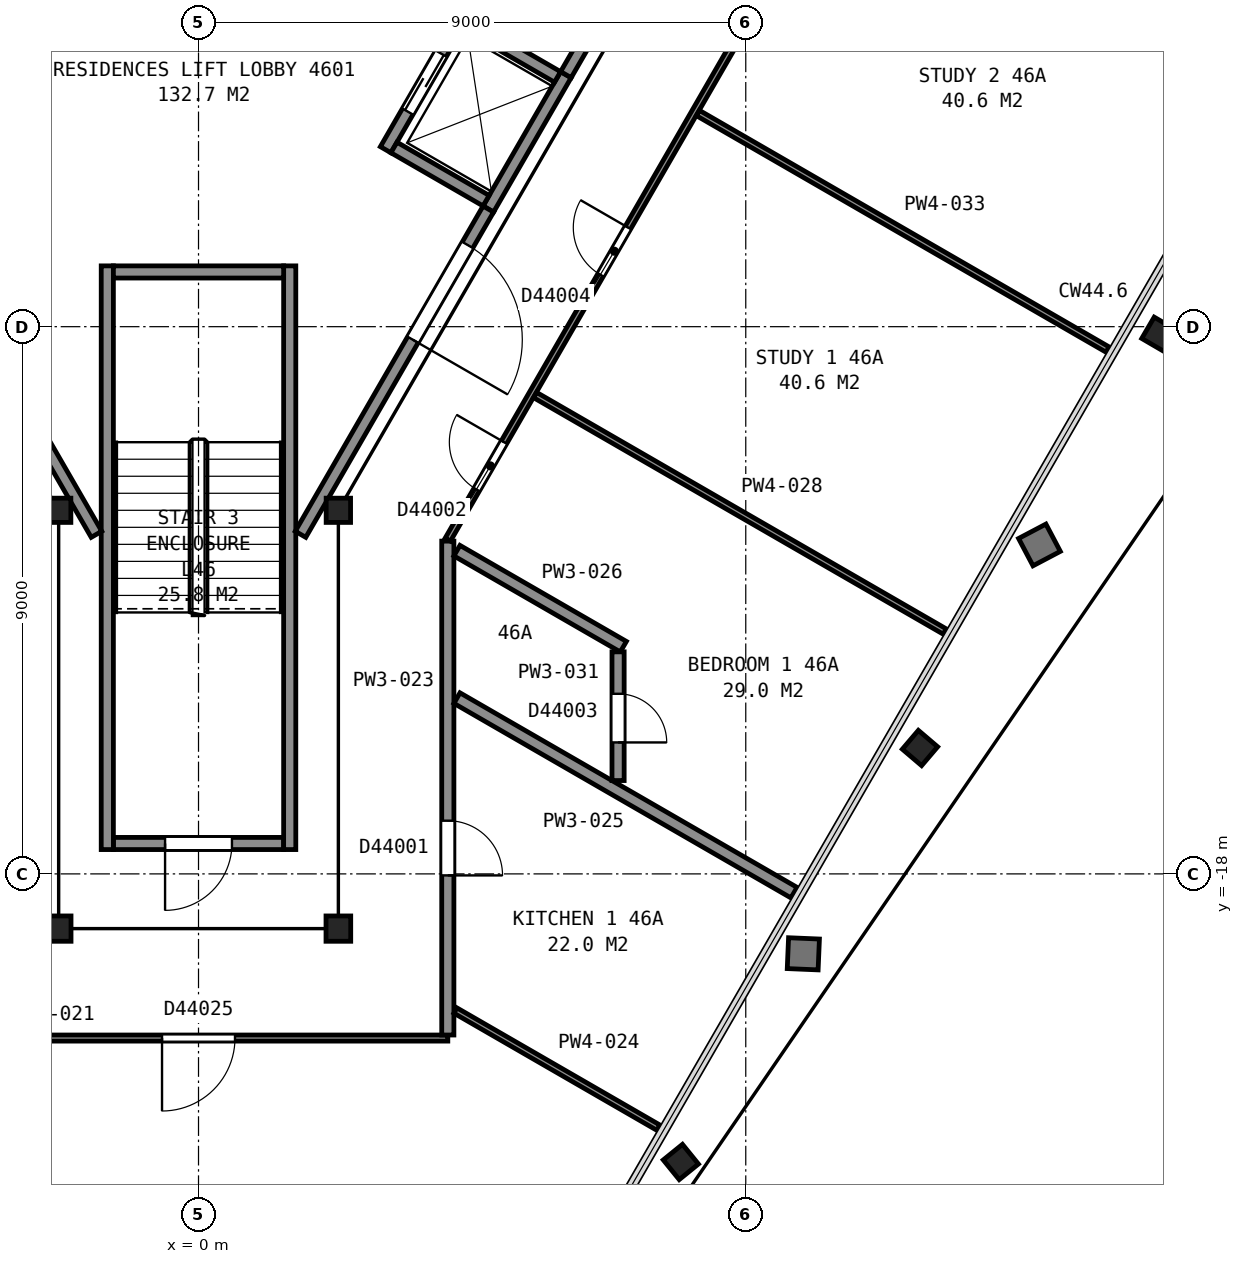
"""IFC4 building model, lengths in metres.
Left out: names, types, materials, properties, quantities, classifications, styles, units other than length and angle.
Written with IfcOpenShell. Run it as: python <this file> out.ifc"""

import sys

from ifc_helpers import new_model, si_unit, direction, frame, frame_2d, origin, origin_2d, place, context, subcontext, project, spatial, rectangle, i_section, extrude, element, fill, save


model = new_model("IFC4")
c1 = context("Model", 3, precision=1e-05, world=origin(), true_north=direction((0.0, 1.0)))
c2 = subcontext(c1, "Body", "Model", "MODEL_VIEW")
j1 = project(units=[si_unit("LENGTHUNIT", "METRE"), si_unit("PLANEANGLEUNIT", "RADIAN")], contexts=[c1])
p1 = place(None, origin())
s1 = spatial("IfcSite", under=j1, at=p1, CompositionType="ELEMENT")
p2 = place(p1, origin())
s2 = spatial("IfcBuilding", under=s1, at=p2, CompositionType="ELEMENT")
p3 = place(p2, frame((0.0, 0.0, 185.8)))
s3 = spatial("IfcBuildingStorey", under=s2, at=p3, CompositionType="ELEMENT", Elevation=185.8)
p4 = place(p3, frame((7.785, -22.556, 0.04), z_axis=(0.124490162422, -0.153645851019, 0.98025259598), x_axis=(-0.498753062579, -0.863744810544, -0.072043631407)))
e1 = element("IfcColumn", 1, at=p4, inside=s3, PredefinedType="COLUMN", context=c2, shape_type="SweptSolid", body=[
    extrude(i_section(OverallWidth=0.406, OverallDepth=0.417, WebThickness=0.03, FlangeThickness=0.048, FilletRadius=0.015, at=origin_2d()), origin(), (0.0, 0.0, 1.0), 3.693),
])
p5 = place(p3, frame((11.695, -15.784, 0.035), z_axis=(0.143331567224, -0.122063012087, 0.982118466845), x_axis=(-0.499578566378, -0.865574550711, -0.03466919636)))
e2 = element("IfcColumn", 2, at=p5, inside=s3, PredefinedType="COLUMN", context=c2, shape_type="SweptSolid", body=[
    extrude(i_section(OverallWidth=0.406, OverallDepth=0.417, WebThickness=0.03, FlangeThickness=0.048, FilletRadius=0.015, at=origin_2d()), origin(), (0.0, 0.0, 1.0), 3.696),
])
p6 = place(p3, frame((15.605, -9.013, 0.03), z_axis=(0.159333785609, -0.093016123912, 0.982833020129), x_axis=(-0.500289595457, -0.865857733626, -0.000840117374)))
e3 = element("IfcColumn", 3, at=p6, inside=s3, PredefinedType="COLUMN", context=c2, shape_type="SweptSolid", body=[
    extrude(i_section(OverallWidth=0.406, OverallDepth=0.417, WebThickness=0.03, FlangeThickness=0.048, FilletRadius=0.015, at=origin_2d()), origin(), (0.0, 0.0, 1.0), 3.703),
])
p7 = place(p3, frame((-2.3, -12.02, 0.0), z_axis=(0.0, 0.0, 1.0), x_axis=(1.0, 0.0, 0.0)))
e4 = element("IfcColumn", 4, at=p7, inside=s3, PredefinedType="COLUMN", context=c2, shape_type="SweptSolid", body=[
    extrude(i_section(OverallWidth=0.401, OverallDepth=0.399, WebThickness=0.025, FlangeThickness=0.04, FilletRadius=0.015, at=origin_2d()), origin(), (0.0, 0.0, 1.0), 3.7),
])
for number, where, z_axis, x_axis in (
    (5, (-2.3, -18.9, 0.0), (0.0, 0.0, 1.0), (-1.0, 0.0, 0.0)),
    (6, (2.3, -18.9, 0.0), (0.0, 0.0, 1.0), (-1.0, 0.0, 0.0)),
):
    element("IfcColumn", number, at=place(p3, frame(where, z_axis=z_axis, x_axis=x_axis)), inside=s3, PredefinedType="COLUMN", context=c2, shape_type="SweptSolid", body=[
        extrude(i_section(OverallWidth=0.406, OverallDepth=0.417, WebThickness=0.03, FlangeThickness=0.048, FilletRadius=0.015, at=origin_2d()), origin(), (0.0, 0.0, 1.0), 3.7),
    ])
p8 = place(p3, frame((2.3, -12.02, 0.0), z_axis=(0.0, 0.0, 1.0), x_axis=(1.0, 0.0, 0.0)))
e7 = element("IfcColumn", 7, at=p8, inside=s3, PredefinedType="COLUMN", context=c2, shape_type="SweptSolid", body=[
    extrude(i_section(OverallWidth=0.401, OverallDepth=0.399, WebThickness=0.025, FlangeThickness=0.04, FilletRadius=0.015, at=origin_2d()), origin(), (0.0, 0.0, 1.0), 3.7),
])
p9 = place(p3, frame((-1.4, -17.5, 0.0), z_axis=(0.0, 0.0, 1.0), x_axis=(1.0, 0.0, 0.0)))
e8 = element("IfcWall", 8, at=p9, inside=s3, PredefinedType="PARTITIONING", context=c2, shape_type="SweptSolid", body=[
    extrude(rectangle(XDim=2.8, YDim=0.2, at=frame_2d((1.4, 0.0))), origin(), (0.0, 0.0, 1.0), 3.45),
])
p10 = place(p9, frame((0.85, 0.0, 0.0)))
e9 = element("IfcOpeningElement", 9, at=p10, cuts=e8, PredefinedType="OPENING", context=c2, shape_type="SweptSolid", body=[
    extrude(rectangle(XDim=1.1, YDim=2.1, at=frame_2d((0.55, 1.05))), frame((0.0, 0.11, 0.0), z_axis=(0.0, -1.0, 0.0), x_axis=(1.0, 0.0, 0.0)), (0.0, 0.0, 1.0), 0.22),
])
for number, where, z_axis, x_axis in (
    (10, (1.5, -8.0, 0.0), (0.0, 0.0, 1.0), (0.0, -1.0, 0.0)),
    (11, (-1.5, -8.0, 0.0), (0.0, 0.0, 1.0), (0.0, -1.0, 0.0)),
):
    element("IfcWall", number, at=place(p3, frame(where, z_axis=z_axis, x_axis=x_axis)), inside=s3, PredefinedType="PARTITIONING", context=c2, shape_type="SweptSolid", body=[
        extrude(rectangle(XDim=9.6, YDim=0.2, at=frame_2d((4.8, 0.0))), origin(), (0.0, 0.0, 1.0), 3.45),
    ])
p11 = place(p3, frame((-1.4, -8.1, 0.0), z_axis=(0.0, 0.0, 1.0), x_axis=(1.0, 0.0, 0.0)))
e12 = element("IfcWall", 12, at=p11, inside=s3, PredefinedType="PARTITIONING", context=c2, shape_type="SweptSolid", body=[
    extrude(rectangle(XDim=2.8, YDim=0.2, at=frame_2d((1.4, 0.0))), origin(), (0.0, 0.0, 1.0), 3.45),
])
p12 = place(p3, frame((4.766, -7.065, 0.0), z_axis=(0.0, 0.0, 1.0), x_axis=(0.499948979701, 0.866054858364, 0.0)))
e13 = element("IfcWall", 13, at=p12, inside=s3, PredefinedType="PARTITIONING", context=c2, shape_type="SweptSolid", body=[
    extrude(rectangle(XDim=2.55, YDim=0.2, at=frame_2d((1.275, 0.0))), origin(), (0.0, 0.0, 1.0), 3.7),
])
p13 = place(p3, frame((3.077, -6.09, 0.0), z_axis=(0.0, 0.0, 1.0), x_axis=(0.500062241894, 0.865989465428, 0.0)))
e14 = element("IfcWall", 14, at=p13, inside=s3, PredefinedType="PARTITIONING", context=c2, shape_type="SweptSolid", body=[
    extrude(rectangle(XDim=2.55, YDim=0.2, at=frame_2d((1.275, 0.0))), origin(), (0.0, 0.0, 1.0), 3.7),
])
p14 = place(p13, frame((0.725, 0.0, 0.0)))
e15 = element("IfcOpeningElement", 15, at=p14, cuts=e14, PredefinedType="OPENING", context=c2, shape_type="SweptSolid", body=[
    extrude(rectangle(XDim=1.1, YDim=2.1, at=frame_2d((0.55, 1.05))), frame((0.0, 0.11, 0.0), z_axis=(0.0, -1.0, 0.0), x_axis=(1.0, 0.0, 0.0)), (0.0, 0.0, 1.0), 0.22),
])
p15 = place(p3, frame((5.905, -4.893, 0.0), z_axis=(0.0, 0.0, 1.0), x_axis=(-0.866002029911, 0.500040482552, 0.0)))
e16 = element("IfcWall", 16, at=p15, inside=s3, PredefinedType="PARTITIONING", context=c2, shape_type="SweptSolid", body=[
    extrude(rectangle(XDim=1.75, YDim=0.2, at=frame_2d((0.875, 0.0))), origin(), (0.0, 0.0, 1.0), 3.7),
])
p16 = place(p3, frame((4.73, -6.928, 0.0), z_axis=(0.0, 0.0, 1.0), x_axis=(-0.866036909293, 0.499980071345, 0.0)))
e17 = element("IfcWall", 17, at=p16, inside=s3, PredefinedType="PARTITIONING", context=c2, shape_type="SweptSolid", body=[
    extrude(rectangle(XDim=1.75, YDim=0.2, at=frame_2d((0.875, 0.0))), origin(), (0.0, 0.0, 1.0), 3.7),
])
p17 = place(p3, frame((-4.655, -7.257, 0.0), z_axis=(0.0, 0.0, 1.0), x_axis=(0.499966124405, -0.866044960985, 0.0)))
e18 = element("IfcWall", 18, at=p17, inside=s3, PredefinedType="PARTITIONING", context=c2, shape_type="SweptSolid", body=[
    extrude(rectangle(XDim=5.956, YDim=0.2, at=frame_2d((2.978, 0.0))), origin(), (0.0, 0.0, 1.0), 3.45),
])
p18 = place(p3, frame((1.677, -12.415, 0.0), z_axis=(0.0, 0.0, 1.0), x_axis=(0.500054337157, 0.865994029939, 0.0)))
e19 = element("IfcWall", 19, at=p18, inside=s3, PredefinedType="PARTITIONING", context=c2, shape_type="SweptSolid", body=[
    extrude(rectangle(XDim=6.177, YDim=0.2, at=frame_2d((3.088, 0.0))), origin(), (0.0, 0.0, 1.0), 3.45),
])
p19 = place(p18, frame((3.695, 0.0, 0.0)))
e20 = element("IfcOpeningElement", 20, at=p19, cuts=e19, PredefinedType="OPENING", context=c2, shape_type="SweptSolid", body=[
    extrude(rectangle(XDim=1.8, YDim=2.1, at=frame_2d((0.9, 1.05))), frame((0.0, 0.11, 0.0), z_axis=(0.0, -1.0, 0.0), x_axis=(1.0, 0.0, 0.0)), (0.0, 0.0, 1.0), 0.22),
])
p20 = place(p3, frame((6.042, -4.855, 0.0), z_axis=(0.0, 0.0, 1.0), x_axis=(0.500252727967, 0.865879442048, 0.0)))
e21 = element("IfcWall", 21, at=p20, inside=s3, PredefinedType="PARTITIONING", context=c2, shape_type="SweptSolid", body=[
    extrude(rectangle(XDim=2.617, YDim=0.2, at=frame_2d((1.309, 0.0))), origin(), (0.0, 0.0, 1.0), 3.45),
])
p21 = place(p3, frame((4.1, -20.7, 0.0), z_axis=(0.0, 0.0, 1.0), x_axis=(-1.0, 0.0, 0.0)))
e22 = element("IfcWall", 22, at=p21, inside=s3, PredefinedType="PARTITIONING", context=c2, shape_type="SweptSolid", body=[
    extrude(rectangle(XDim=8.25, YDim=0.1, at=frame_2d((4.125, 0.0))), origin(), (0.0, 0.0, 1.0), 2.713),
])
p22 = place(p21, frame((3.5, 0.0, 0.0)))
e23 = element("IfcOpeningElement", 23, at=p22, cuts=e22, PredefinedType="OPENING", context=c2, shape_type="SweptSolid", body=[
    extrude(rectangle(XDim=1.2, YDim=2.1, at=frame_2d((0.6, 1.05))), frame((0.0, 0.06, 0.0), z_axis=(0.0, -1.0, 0.0), x_axis=(1.0, 0.0, 0.0)), (0.0, 0.0, 1.0), 0.12),
])
p23 = place(p3, frame((4.1, -12.527, 0.0), z_axis=(0.0, 0.0, 1.0), x_axis=(0.0, -1.0, 0.0)))
e24 = element("IfcWall", 24, at=p23, inside=s3, PredefinedType="PARTITIONING", context=c2, shape_type="SweptSolid", body=[
    extrude(rectangle(XDim=8.123, YDim=0.2, at=frame_2d((4.062, 0.0))), origin(), (0.0, 0.0, 1.0), 2.713),
])
p24 = place(p23, frame((4.598, 0.0, 0.0)))
e25 = element("IfcOpeningElement", 25, at=p24, cuts=e24, PredefinedType="OPENING", context=c2, shape_type="SweptSolid", body=[
    extrude(rectangle(XDim=0.9, YDim=2.1, at=frame_2d((0.45, 1.05))), frame((0.0, 0.11, 0.0), z_axis=(0.0, -1.0, 0.0), x_axis=(1.0, 0.0, 0.0)), (0.0, 0.0, 1.0), 0.22),
])
p25 = place(p3, frame((4.225, -20.247, 0.0), z_axis=(0.0, 0.0, 1.0), x_axis=(0.866070569679, -0.499921762215, 0.0)))
e26 = element("IfcWall", 26, at=p25, inside=s3, PredefinedType="PARTITIONING", context=c2, shape_type="SweptSolid", body=[
    extrude(rectangle(XDim=3.853, YDim=0.1, at=frame_2d((1.926, 0.0))), origin(), (0.0, 0.0, 1.0), 2.713),
])
p26 = place(p3, frame((4.25, -15.109, 0.0), z_axis=(0.0, 0.0, 1.0), x_axis=(0.866077604108, -0.499909575486, 0.0)))
e27 = element("IfcWall", 27, at=p26, inside=s3, PredefinedType="PARTITIONING", context=c2, shape_type="SweptSolid", body=[
    extrude(rectangle(XDim=6.4, YDim=0.2, at=frame_2d((3.2, 0.0))), origin(), (0.0, 0.0, 1.0), 2.713),
])
p27 = place(p3, frame((4.25, -12.684, 0.0), z_axis=(0.0, 0.0, 1.0), x_axis=(0.866109679077, -0.499854002494, 0.0)))
e28 = element("IfcWall", 28, at=p27, inside=s3, PredefinedType="PARTITIONING", context=c2, shape_type="SweptSolid", body=[
    extrude(rectangle(XDim=3.16, YDim=0.2, at=frame_2d((1.58, 0.0))), origin(), (0.0, 0.0, 1.0), 2.713),
])
p28 = place(p3, frame((12.903, 2.745, 0.0), z_axis=(0.0, 0.0, 1.0), x_axis=(-0.499997333799, -0.866026943111, 0.0)))
e29 = element("IfcWall", 29, at=p28, inside=s3, PredefinedType="PARTITIONING", context=c2, shape_type="SweptSolid", body=[
    extrude(rectangle(XDim=17.606, YDim=0.1, at=frame_2d((8.803, 0.0))), origin(), (0.0, 0.0, 1.0), 2.713),
])
p29 = place(p28, frame((15.756, 0.0, 0.0)))
e30 = element("IfcOpeningElement", 30, at=p29, cuts=e29, PredefinedType="OPENING", context=c2, shape_type="SweptSolid", body=[
    extrude(rectangle(XDim=0.9, YDim=2.1, at=frame_2d((0.45, 1.05))), frame((0.0, 0.06, 0.0), z_axis=(0.0, -1.0, 0.0), x_axis=(1.0, 0.0, 0.0)), (0.0, 0.0, 1.0), 0.12),
])
p30 = place(p28, frame((11.679, 0.0, 0.0)))
e31 = element("IfcOpeningElement", 31, at=p30, cuts=e29, PredefinedType="OPENING", context=c2, shape_type="SweptSolid", body=[
    extrude(rectangle(XDim=0.9, YDim=2.1, at=frame_2d((0.45, 1.05))), frame((0.0, 0.06, 0.0), z_axis=(0.0, -1.0, 0.0), x_axis=(1.0, 0.0, 0.0)), (0.0, 0.0, 1.0), 0.12),
])
p31 = place(p28, frame((6.324, 0.0, 0.0)))
e32 = element("IfcOpeningElement", 32, at=p31, cuts=e29, PredefinedType="OPENING", context=c2, shape_type="SweptSolid", body=[
    extrude(rectangle(XDim=0.9, YDim=2.1, at=frame_2d((0.45, 1.05))), frame((0.0, 0.06, 0.0), z_axis=(0.0, -1.0, 0.0), x_axis=(1.0, 0.0, 0.0)), (0.0, 0.0, 1.0), 0.12),
])
p32 = place(p3, frame((5.536, -10.125, 0.0), z_axis=(0.0, 0.0, 1.0), x_axis=(0.866044474677, -0.49996696679, 0.0)))
e33 = element("IfcWall", 33, at=p32, inside=s3, PredefinedType="PARTITIONING", context=c2, shape_type="SweptSolid", body=[
    extrude(rectangle(XDim=7.779, YDim=0.1, at=frame_2d((3.889, 0.0))), origin(), (0.0, 0.0, 1.0), 2.713),
])
p33 = place(p3, frame((6.9, -16.465, 0.0), z_axis=(0.0, 0.0, 1.0), x_axis=(0.0, 1.0, 0.0)))
e34 = element("IfcWall", 34, at=p33, inside=s3, PredefinedType="PARTITIONING", context=c2, shape_type="SweptSolid", body=[
    extrude(rectangle(XDim=2.117, YDim=0.2, at=frame_2d((1.059, 0.0))), origin(), (0.0, 0.0, 1.0), 2.713),
])
p34 = place(p33, frame((0.627, 0.0, 0.0)))
e35 = element("IfcOpeningElement", 35, at=p34, cuts=e34, PredefinedType="OPENING", context=c2, shape_type="SweptSolid", body=[
    extrude(rectangle(XDim=0.8, YDim=2.1, at=frame_2d((0.4, 1.05))), frame((0.0, 0.11, 0.0), z_axis=(0.0, -1.0, 0.0), x_axis=(1.0, 0.0, 0.0)), (0.0, 0.0, 1.0), 0.22),
])
p35 = place(p3, frame((8.214, -5.487, 0.0), z_axis=(0.0, 0.0, 1.0), x_axis=(0.866007344409, -0.500031278452, 0.0)))
e36 = element("IfcWall", 36, at=p35, inside=s3, PredefinedType="PARTITIONING", context=c2, shape_type="SweptSolid", body=[
    extrude(rectangle(XDim=7.778, YDim=0.1, at=frame_2d((3.889, 0.0))), origin(), (0.0, 0.0, 1.0), 2.713),
])
p36 = place(p3, frame((10.887, -0.846, 0.0), z_axis=(0.0, 0.0, 1.0), x_axis=(0.866004841997, -0.500035612369, 0.0)))
e37 = element("IfcWall", 37, at=p36, inside=s3, PredefinedType="PARTITIONING", context=c2, shape_type="SweptSolid", body=[
    extrude(rectangle(XDim=7.783, YDim=0.1, at=frame_2d((3.892, 0.0))), origin(), (0.0, 0.0, 1.0), 2.713),
])
p37 = place(p10, origin())
e38 = element("IfcDoor", 38, at=p37, inside=s3, OperationType="SINGLE_SWING_LEFT", PredefinedType="DOOR", context=c2, shape_type="SweptSolid", body=[
    extrude(rectangle(XDim=1.1, YDim=2.1, at=frame_2d((0.55, 1.05))), frame((0.0, 0.025, 0.0), z_axis=(0.0, -1.0, 0.0), x_axis=(1.0, 0.0, 0.0)), (0.0, 0.0, 1.0), 0.05),
])
fill(e9, e38)
p38 = place(p14, origin())
e39 = element("IfcDoor", 39, at=p38, inside=s3, OperationType="SLIDING_TO_LEFT", PredefinedType="DOOR", context=c2, shape_type="SweptSolid", body=[
    extrude(rectangle(XDim=1.1, YDim=2.1, at=frame_2d((0.55, 1.05))), frame((0.0, 0.025, 0.0), z_axis=(0.0, -1.0, 0.0), x_axis=(1.0, 0.0, 0.0)), (0.0, 0.0, 1.0), 0.05),
])
fill(e15, e39)
p39 = place(p19, origin())
e40 = element("IfcDoor", 40, at=p39, inside=s3, OperationType="DOUBLE_DOOR_SINGLE_SWING", PredefinedType="DOOR", context=c2, shape_type="SweptSolid", body=[
    extrude(rectangle(XDim=1.8, YDim=2.1, at=frame_2d((0.9, 1.05))), frame((0.0, 0.025, 0.0), z_axis=(0.0, -1.0, 0.0), x_axis=(1.0, 0.0, 0.0)), (0.0, 0.0, 1.0), 0.05),
])
fill(e20, e40)
p40 = place(p22, origin())
e41 = element("IfcDoor", 41, at=p40, inside=s3, OperationType="SINGLE_SWING_RIGHT", PredefinedType="DOOR", context=c2, shape_type="SweptSolid", body=[
    extrude(rectangle(XDim=1.2, YDim=2.1, at=frame_2d((0.6, 1.05))), frame((0.0, 0.025, 0.0), z_axis=(0.0, -1.0, 0.0), x_axis=(1.0, 0.0, 0.0)), (0.0, 0.0, 1.0), 0.05),
])
fill(e23, e41)
p41 = place(p24, origin())
e42 = element("IfcDoor", 42, at=p41, inside=s3, OperationType="SINGLE_SWING_RIGHT", PredefinedType="DOOR", context=c2, shape_type="SweptSolid", body=[
    extrude(rectangle(XDim=0.9, YDim=2.1, at=frame_2d((0.45, 1.05))), frame((0.0, 0.025, 0.0), z_axis=(0.0, -1.0, 0.0), x_axis=(1.0, 0.0, 0.0)), (0.0, 0.0, 1.0), 0.05),
])
fill(e25, e42)
p42 = place(p29, origin())
e43 = element("IfcDoor", 43, at=p42, inside=s3, OperationType="SINGLE_SWING_LEFT", PredefinedType="DOOR", context=c2, shape_type="SweptSolid", body=[
    extrude(rectangle(XDim=0.9, YDim=2.1, at=frame_2d((0.45, 1.05))), frame((0.0, 0.025, 0.0), z_axis=(0.0, -1.0, 0.0), x_axis=(1.0, 0.0, 0.0)), (0.0, 0.0, 1.0), 0.05),
])
fill(e30, e43)
p43 = place(p30, origin())
e44 = element("IfcDoor", 44, at=p43, inside=s3, OperationType="SINGLE_SWING_LEFT", PredefinedType="DOOR", context=c2, shape_type="SweptSolid", body=[
    extrude(rectangle(XDim=0.9, YDim=2.1, at=frame_2d((0.45, 1.05))), frame((0.0, 0.025, 0.0), z_axis=(0.0, -1.0, 0.0), x_axis=(1.0, 0.0, 0.0)), (0.0, 0.0, 1.0), 0.05),
])
fill(e31, e44)
p44 = place(p34, origin())
e45 = element("IfcDoor", 45, at=p44, inside=s3, OperationType="SINGLE_SWING_LEFT", PredefinedType="DOOR", context=c2, shape_type="SweptSolid", body=[
    extrude(rectangle(XDim=0.8, YDim=2.1, at=frame_2d((0.4, 1.05))), frame((0.0, 0.025, 0.0), z_axis=(0.0, -1.0, 0.0), x_axis=(1.0, 0.0, 0.0)), (0.0, 0.0, 1.0), 0.05),
])
fill(e35, e45)
save(model, sys.argv[1])
